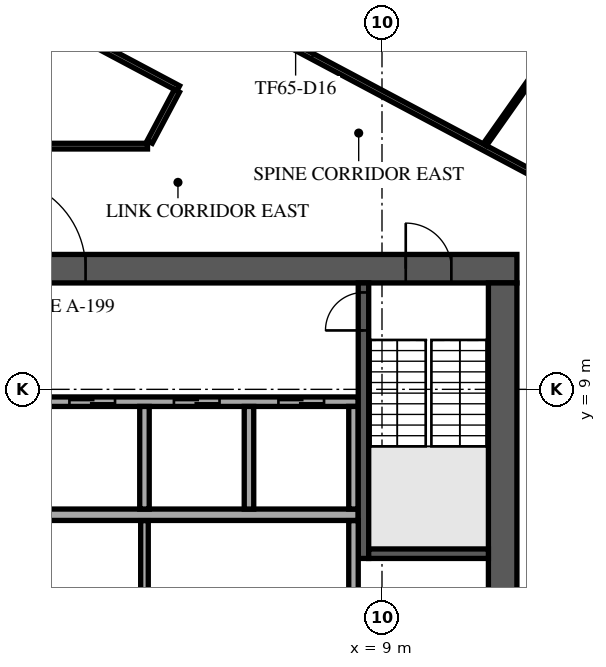
"""IFC4 building model, lengths in metres.
Left out: names, types, materials, properties, quantities, classifications, styles, units other than length and angle.
Written with IfcOpenShell. Run it as: python <this file> out.ifc"""

import sys

from ifc_helpers import new_model, si_unit, direction, frame, frame_2d, origin, place, context, subcontext, project, spatial, rectangle, extrude, element, fill, save


model = new_model("IFC4")
c1 = context("Model", 3, precision=1e-05, world=origin(), true_north=direction((0.0, 1.0)))
c2 = subcontext(c1, "Body", "Model", "MODEL_VIEW")
j1 = project(units=[si_unit("LENGTHUNIT", "METRE"), si_unit("PLANEANGLEUNIT", "RADIAN")], contexts=[c1])
p1 = place(None, origin())
s1 = spatial("IfcSite", under=j1, at=p1, CompositionType="ELEMENT")
p2 = place(p1, origin())
s2 = spatial("IfcBuilding", under=s1, at=p2, CompositionType="ELEMENT")
p3 = place(p2, frame((0.0, 0.0, 274.9)))
s3 = spatial("IfcBuildingStorey", under=s2, at=p3, CompositionType="ELEMENT", Elevation=274.9)
p4 = place(p3, frame((-12.55, 12.175, 0.0), z_axis=(0.0, 0.0, 1.0), x_axis=(1.0, 0.0, 0.0)))
e1 = element("IfcWall", 1, at=p4, inside=s3, PredefinedType="SHEAR", context=c2, shape_type="SweptSolid", body=[
    extrude(rectangle(XDim=25.1, YDim=0.75, at=frame_2d((12.55, 0.0))), origin(), (0.0, 0.0, 1.0), 3.64),
])
p5 = place(p4, frame((11.35, 0.0, 0.0)))
e2 = element("IfcOpeningElement", 2, at=p5, cuts=e1, PredefinedType="OPENING", context=c2, shape_type="SweptSolid", body=[
    extrude(rectangle(XDim=2.4, YDim=2.4, at=frame_2d((1.2, 1.2))), frame((0.0, 0.385, 0.0), z_axis=(0.0, -1.0, 0.0), x_axis=(1.0, 0.0, 0.0)), (0.0, 0.0, 1.0), 0.77),
])
p6 = place(p4, frame((22.175, 0.0, 0.0)))
e3 = element("IfcOpeningElement", 3, at=p6, cuts=e1, PredefinedType="OPENING", context=c2, shape_type="SweptSolid", body=[
    extrude(rectangle(XDim=1.2, YDim=2.1, at=frame_2d((0.6, 1.05))), frame((0.0, 0.385, 0.0), z_axis=(0.0, -1.0, 0.0), x_axis=(1.0, 0.0, 0.0)), (0.0, 0.0, 1.0), 0.77),
])
p7 = place(p4, frame((1.15, 0.0, 0.0)))
e4 = element("IfcOpeningElement", 4, at=p7, cuts=e1, PredefinedType="OPENING", context=c2, shape_type="SweptSolid", body=[
    extrude(rectangle(XDim=1.0, YDim=2.1, at=frame_2d((0.5, 1.05))), frame((0.0, 0.385, 0.0), z_axis=(0.0, -1.0, 0.0), x_axis=(1.0, 0.0, 0.0)), (0.0, 0.0, 1.0), 0.77),
])
p8 = place(p3, frame((12.175, -11.8, 0.0), z_axis=(0.0, 0.0, 1.0), x_axis=(0.0, 1.0, 0.0)))
e5 = element("IfcWall", 5, at=p8, inside=s3, PredefinedType="SHEAR", context=c2, shape_type="SweptSolid", body=[
    extrude(rectangle(XDim=23.6, YDim=0.75, at=frame_2d((11.8, 0.0))), origin(), (0.0, 0.0, 1.0), 3.64),
])
p9 = place(p8, frame((10.6, 0.0, 0.0)))
e6 = element("IfcOpeningElement", 6, at=p9, cuts=e5, PredefinedType="OPENING", context=c2, shape_type="SweptSolid", body=[
    extrude(rectangle(XDim=2.4, YDim=2.4, at=frame_2d((1.2, 1.2))), frame((0.0, 0.385, 0.0), z_axis=(0.0, -1.0, 0.0), x_axis=(1.0, 0.0, 0.0)), (0.0, 0.0, 1.0), 0.77),
])
p10 = place(p3, frame((-8.375, 5.7, 0.0), z_axis=(0.0, 0.0, 1.0), x_axis=(1.0, 0.0, 0.0)))
e7 = element("IfcWall", 7, at=p10, inside=s3, PredefinedType="SOLIDWALL", context=c2, shape_type="SweptSolid", body=[
    extrude(rectangle(XDim=16.75, YDim=0.3, at=frame_2d((8.375, 0.0))), origin(), (0.0, 0.0, 1.0), 3.64),
])
p11 = place(p3, frame((-8.375, 8.675, 0.0), z_axis=(0.0, 0.0, 1.0), x_axis=(1.0, 0.0, 0.0)))
e8 = element("IfcWall", 8, at=p11, inside=s3, PredefinedType="SOLIDWALL", context=c2, shape_type="SweptSolid", body=[
    extrude(rectangle(XDim=16.75, YDim=0.25, at=frame_2d((8.375, 0.0))), origin(), (0.0, 0.0, 1.0), 3.64),
])
p12 = place(p11, frame((0.9, 0.0, 0.0)))
e9 = element("IfcOpeningElement", 9, at=p12, cuts=e8, PredefinedType="OPENING", context=c2, shape_type="SweptSolid", body=[
    extrude(rectangle(XDim=1.2, YDim=2.1, at=frame_2d((0.6, 1.05))), frame((0.0, 0.135, 0.0), z_axis=(0.0, -1.0, 0.0), x_axis=(1.0, 0.0, 0.0)), (0.0, 0.0, 1.0), 0.27),
])
p13 = place(p11, frame((3.65, 0.0, 0.0)))
e10 = element("IfcOpeningElement", 10, at=p13, cuts=e8, PredefinedType="OPENING", context=c2, shape_type="SweptSolid", body=[
    extrude(rectangle(XDim=1.2, YDim=2.1, at=frame_2d((0.6, 1.05))), frame((0.0, 0.135, 0.0), z_axis=(0.0, -1.0, 0.0), x_axis=(1.0, 0.0, 0.0)), (0.0, 0.0, 1.0), 0.27),
])
p14 = place(p11, frame((6.4, 0.0, 0.0)))
e11 = element("IfcOpeningElement", 11, at=p14, cuts=e8, PredefinedType="OPENING", context=c2, shape_type="SweptSolid", body=[
    extrude(rectangle(XDim=1.2, YDim=2.1, at=frame_2d((0.6, 1.05))), frame((0.0, 0.135, 0.0), z_axis=(0.0, -1.0, 0.0), x_axis=(1.0, 0.0, 0.0)), (0.0, 0.0, 1.0), 0.27),
])
p15 = place(p11, frame((9.15, 0.0, 0.0)))
e12 = element("IfcOpeningElement", 12, at=p15, cuts=e8, PredefinedType="OPENING", context=c2, shape_type="SweptSolid", body=[
    extrude(rectangle(XDim=1.2, YDim=2.1, at=frame_2d((0.6, 1.05))), frame((0.0, 0.135, 0.0), z_axis=(0.0, -1.0, 0.0), x_axis=(1.0, 0.0, 0.0)), (0.0, 0.0, 1.0), 0.27),
])
p16 = place(p11, frame((11.9, 0.0, 0.0)))
e13 = element("IfcOpeningElement", 13, at=p16, cuts=e8, PredefinedType="OPENING", context=c2, shape_type="SweptSolid", body=[
    extrude(rectangle(XDim=1.2, YDim=2.1, at=frame_2d((0.6, 1.05))), frame((0.0, 0.135, 0.0), z_axis=(0.0, -1.0, 0.0), x_axis=(1.0, 0.0, 0.0)), (0.0, 0.0, 1.0), 0.27),
])
p17 = place(p11, frame((14.65, 0.0, 0.0)))
e14 = element("IfcOpeningElement", 14, at=p17, cuts=e8, PredefinedType="OPENING", context=c2, shape_type="SweptSolid", body=[
    extrude(rectangle(XDim=1.2, YDim=2.1, at=frame_2d((0.6, 1.05))), frame((0.0, 0.135, 0.0), z_axis=(0.0, -1.0, 0.0), x_axis=(1.0, 0.0, 0.0)), (0.0, 0.0, 1.0), 0.27),
])
for number, where, z_axis, x_axis in (
    (15, (2.75, 5.85, 0.0), (0.0, 0.0, 1.0), (0.0, 1.0, 0.0)),
    (16, (5.5, 5.85, 0.0), (0.0, 0.0, 1.0), (0.0, 1.0, 0.0)),
    (17, (8.25, 5.85, 0.0), (0.0, 0.0, 1.0), (0.0, 1.0, 0.0)),
):
    element("IfcWall", number, at=place(p3, frame(where, z_axis=z_axis, x_axis=x_axis)), inside=s3, PredefinedType="SOLIDWALL", context=c2, shape_type="SweptSolid", body=[
        extrude(rectangle(XDim=2.7, YDim=0.25, at=frame_2d((1.35, 0.0))), origin(), (0.0, 0.0, 1.0), 3.64),
    ])
p18 = place(p3, frame((8.512, 4.55, 0.0), z_axis=(0.0, 0.0, 1.0), x_axis=(0.0, 1.0, 0.0)))
e18 = element("IfcWall", 18, at=p18, inside=s3, PredefinedType="SOLIDWALL", context=c2, shape_type="SweptSolid", body=[
    extrude(rectangle(XDim=7.25, YDim=0.275, at=frame_2d((3.625, 0.0))), origin(), (0.0, 0.0, 1.0), 3.64),
])
p19 = place(p18, frame((6.0, 0.0, 0.0)))
e19 = element("IfcOpeningElement", 19, at=p19, cuts=e18, PredefinedType="OPENING", context=c2, shape_type="SweptSolid", body=[
    extrude(rectangle(XDim=1.0, YDim=2.1, at=frame_2d((0.5, 1.05))), frame((0.0, 0.147, 0.0), z_axis=(0.0, -1.0, 0.0), x_axis=(1.0, 0.0, 0.0)), (0.0, 0.0, 1.0), 0.295),
])
p20 = place(p3, frame((8.65, 4.675, 0.0), z_axis=(0.0, 0.0, 1.0), x_axis=(1.0, 0.0, 0.0)))
e20 = element("IfcWall", 20, at=p20, inside=s3, PredefinedType="SOLIDWALL", context=c2, shape_type="SweptSolid", body=[
    extrude(rectangle(XDim=3.15, YDim=0.25, at=frame_2d((1.575, 0.0))), origin(), (0.0, 0.0, 1.0), 3.64),
])
p21 = place(p3, frame((2.75, 2.855, 0.0), z_axis=(0.0, 0.0, 1.0), x_axis=(0.0, 1.0, 0.0)))
e21 = element("IfcWall", 21, at=p21, inside=s3, PredefinedType="PARTITIONING", context=c2, shape_type="SweptSolid", body=[
    extrude(rectangle(XDim=2.69, YDim=0.2, at=frame_2d((1.345, 0.0))), origin(), (0.0, 0.0, 1.0), 3.64),
])
p22 = place(p3, frame((8.25, 2.855, 0.0), z_axis=(0.0, 0.0, 1.0), x_axis=(0.0, 1.0, 0.0)))
e22 = element("IfcWall", 22, at=p22, inside=s3, PredefinedType="PARTITIONING", context=c2, shape_type="SweptSolid", body=[
    extrude(rectangle(XDim=2.69, YDim=0.25, at=frame_2d((1.345, 0.0))), origin(), (0.0, 0.0, 1.0), 3.64),
])
p23 = place(p3, frame((9.233, -32.479, 0.0), z_axis=(0.0, 0.0, 1.0), x_axis=(0.469468429065, 0.882949259081, 0.0)))
e23 = element("IfcWall", 23, at=p23, inside=s3, PredefinedType="STANDARD", context=c2, shape_type="SweptSolid", body=[
    extrude(rectangle(XDim=48.686, YDim=0.6, at=frame_2d((24.343, 0.0))), origin(), (0.0, 0.0, 1.0), 3.64),
])
p24 = place(p23, frame((1.213, 0.0, 0.9)))
e24 = element("IfcOpeningElement", 24, at=p24, cuts=e23, PredefinedType="OPENING", context=c2, shape_type="SweptSolid", body=[
    extrude(rectangle(XDim=2.0, YDim=2.1, at=frame_2d((1.0, 1.05))), frame((0.0, 0.31, 0.0), z_axis=(0.0, -1.0, 0.0), x_axis=(1.0, 0.0, 0.0)), (0.0, 0.0, 1.0), 0.62),
])
p25 = place(p23, frame((5.639, 0.0, 0.9)))
e25 = element("IfcOpeningElement", 25, at=p25, cuts=e23, PredefinedType="OPENING", context=c2, shape_type="SweptSolid", body=[
    extrude(rectangle(XDim=2.0, YDim=2.1, at=frame_2d((1.0, 1.05))), frame((0.0, 0.31, 0.0), z_axis=(0.0, -1.0, 0.0), x_axis=(1.0, 0.0, 0.0)), (0.0, 0.0, 1.0), 0.62),
])
p26 = place(p23, frame((10.065, 0.0, 0.9)))
e26 = element("IfcOpeningElement", 26, at=p26, cuts=e23, PredefinedType="OPENING", context=c2, shape_type="SweptSolid", body=[
    extrude(rectangle(XDim=2.0, YDim=2.1, at=frame_2d((1.0, 1.05))), frame((0.0, 0.31, 0.0), z_axis=(0.0, -1.0, 0.0), x_axis=(1.0, 0.0, 0.0)), (0.0, 0.0, 1.0), 0.62),
])
p27 = place(p23, frame((14.491, 0.0, 0.9)))
e27 = element("IfcOpeningElement", 27, at=p27, cuts=e23, PredefinedType="OPENING", context=c2, shape_type="SweptSolid", body=[
    extrude(rectangle(XDim=2.0, YDim=2.1, at=frame_2d((1.0, 1.05))), frame((0.0, 0.31, 0.0), z_axis=(0.0, -1.0, 0.0), x_axis=(1.0, 0.0, 0.0)), (0.0, 0.0, 1.0), 0.62),
])
p28 = place(p23, frame((18.917, 0.0, 0.9)))
e28 = element("IfcOpeningElement", 28, at=p28, cuts=e23, PredefinedType="OPENING", context=c2, shape_type="SweptSolid", body=[
    extrude(rectangle(XDim=2.0, YDim=2.1, at=frame_2d((1.0, 1.05))), frame((0.0, 0.31, 0.0), z_axis=(0.0, -1.0, 0.0), x_axis=(1.0, 0.0, 0.0)), (0.0, 0.0, 1.0), 0.62),
])
p29 = place(p23, frame((23.343, 0.0, 0.9)))
e29 = element("IfcOpeningElement", 29, at=p29, cuts=e23, PredefinedType="OPENING", context=c2, shape_type="SweptSolid", body=[
    extrude(rectangle(XDim=2.0, YDim=2.1, at=frame_2d((1.0, 1.05))), frame((0.0, 0.31, 0.0), z_axis=(0.0, -1.0, 0.0), x_axis=(1.0, 0.0, 0.0)), (0.0, 0.0, 1.0), 0.62),
])
p30 = place(p23, frame((27.769, 0.0, 0.9)))
e30 = element("IfcOpeningElement", 30, at=p30, cuts=e23, PredefinedType="OPENING", context=c2, shape_type="SweptSolid", body=[
    extrude(rectangle(XDim=2.0, YDim=2.1, at=frame_2d((1.0, 1.05))), frame((0.0, 0.31, 0.0), z_axis=(0.0, -1.0, 0.0), x_axis=(1.0, 0.0, 0.0)), (0.0, 0.0, 1.0), 0.62),
])
p31 = place(p23, frame((32.195, 0.0, 0.9)))
e31 = element("IfcOpeningElement", 31, at=p31, cuts=e23, PredefinedType="OPENING", context=c2, shape_type="SweptSolid", body=[
    extrude(rectangle(XDim=2.0, YDim=2.1, at=frame_2d((1.0, 1.05))), frame((0.0, 0.31, 0.0), z_axis=(0.0, -1.0, 0.0), x_axis=(1.0, 0.0, 0.0)), (0.0, 0.0, 1.0), 0.62),
])
p32 = place(p23, frame((36.621, 0.0, 0.9)))
e32 = element("IfcOpeningElement", 32, at=p32, cuts=e23, PredefinedType="OPENING", context=c2, shape_type="SweptSolid", body=[
    extrude(rectangle(XDim=2.0, YDim=2.1, at=frame_2d((1.0, 1.05))), frame((0.0, 0.31, 0.0), z_axis=(0.0, -1.0, 0.0), x_axis=(1.0, 0.0, 0.0)), (0.0, 0.0, 1.0), 0.62),
])
p33 = place(p23, frame((41.047, 0.0, 0.9)))
e33 = element("IfcOpeningElement", 33, at=p33, cuts=e23, PredefinedType="OPENING", context=c2, shape_type="SweptSolid", body=[
    extrude(rectangle(XDim=2.0, YDim=2.1, at=frame_2d((1.0, 1.05))), frame((0.0, 0.31, 0.0), z_axis=(0.0, -1.0, 0.0), x_axis=(1.0, 0.0, 0.0)), (0.0, 0.0, 1.0), 0.62),
])
p34 = place(p23, frame((45.473, 0.0, 0.9)))
e34 = element("IfcOpeningElement", 34, at=p34, cuts=e23, PredefinedType="OPENING", context=c2, shape_type="SweptSolid", body=[
    extrude(rectangle(XDim=2.0, YDim=2.1, at=frame_2d((1.0, 1.05))), frame((0.0, 0.31, 0.0), z_axis=(0.0, -1.0, 0.0), x_axis=(1.0, 0.0, 0.0)), (0.0, 0.0, 1.0), 0.62),
])
p35 = place(p3, frame((29.875, 17.753, 0.0), z_axis=(0.0, 0.0, 1.0), x_axis=(-0.88294707281, 0.469472540854, 0.0)))
e35 = element("IfcWall", 35, at=p35, inside=s3, PredefinedType="STANDARD", context=c2, shape_type="SweptSolid", body=[
    extrude(rectangle(XDim=36.243, YDim=0.6, at=frame_2d((18.122, 0.0))), origin(), (0.0, 0.0, 1.0), 3.64),
])
p36 = place(p35, frame((1.215, 0.0, 0.9)))
e36 = element("IfcOpeningElement", 36, at=p36, cuts=e35, PredefinedType="OPENING", context=c2, shape_type="SweptSolid", body=[
    extrude(rectangle(XDim=2.1, YDim=2.1, at=frame_2d((1.05, 1.05))), frame((0.0, 0.31, 0.0), z_axis=(0.0, -1.0, 0.0), x_axis=(1.0, 0.0, 0.0)), (0.0, 0.0, 1.0), 0.62),
])
p37 = place(p35, frame((5.746, 0.0, 0.9)))
e37 = element("IfcOpeningElement", 37, at=p37, cuts=e35, PredefinedType="OPENING", context=c2, shape_type="SweptSolid", body=[
    extrude(rectangle(XDim=2.1, YDim=2.1, at=frame_2d((1.05, 1.05))), frame((0.0, 0.31, 0.0), z_axis=(0.0, -1.0, 0.0), x_axis=(1.0, 0.0, 0.0)), (0.0, 0.0, 1.0), 0.62),
])
p38 = place(p35, frame((10.276, 0.0, 0.9)))
e38 = element("IfcOpeningElement", 38, at=p38, cuts=e35, PredefinedType="OPENING", context=c2, shape_type="SweptSolid", body=[
    extrude(rectangle(XDim=2.1, YDim=2.1, at=frame_2d((1.05, 1.05))), frame((0.0, 0.31, 0.0), z_axis=(0.0, -1.0, 0.0), x_axis=(1.0, 0.0, 0.0)), (0.0, 0.0, 1.0), 0.62),
])
p39 = place(p35, frame((14.806, 0.0, 0.9)))
e39 = element("IfcOpeningElement", 39, at=p39, cuts=e35, PredefinedType="OPENING", context=c2, shape_type="SweptSolid", body=[
    extrude(rectangle(XDim=2.1, YDim=2.1, at=frame_2d((1.05, 1.05))), frame((0.0, 0.31, 0.0), z_axis=(0.0, -1.0, 0.0), x_axis=(1.0, 0.0, 0.0)), (0.0, 0.0, 1.0), 0.62),
])
p40 = place(p35, frame((19.337, 0.0, 0.9)))
e40 = element("IfcOpeningElement", 40, at=p40, cuts=e35, PredefinedType="OPENING", context=c2, shape_type="SweptSolid", body=[
    extrude(rectangle(XDim=2.1, YDim=2.1, at=frame_2d((1.05, 1.05))), frame((0.0, 0.31, 0.0), z_axis=(0.0, -1.0, 0.0), x_axis=(1.0, 0.0, 0.0)), (0.0, 0.0, 1.0), 0.62),
])
p41 = place(p35, frame((23.867, 0.0, 0.9)))
e41 = element("IfcOpeningElement", 41, at=p41, cuts=e35, PredefinedType="OPENING", context=c2, shape_type="SweptSolid", body=[
    extrude(rectangle(XDim=2.1, YDim=2.1, at=frame_2d((1.05, 1.05))), frame((0.0, 0.31, 0.0), z_axis=(0.0, -1.0, 0.0), x_axis=(1.0, 0.0, 0.0)), (0.0, 0.0, 1.0), 0.62),
])
p42 = place(p35, frame((28.398, 0.0, 0.9)))
e42 = element("IfcOpeningElement", 42, at=p42, cuts=e35, PredefinedType="OPENING", context=c2, shape_type="SweptSolid", body=[
    extrude(rectangle(XDim=2.1, YDim=2.1, at=frame_2d((1.05, 1.05))), frame((0.0, 0.31, 0.0), z_axis=(0.0, -1.0, 0.0), x_axis=(1.0, 0.0, 0.0)), (0.0, 0.0, 1.0), 0.62),
])
p43 = place(p35, frame((32.928, 0.0, 0.9)))
e43 = element("IfcOpeningElement", 43, at=p43, cuts=e35, PredefinedType="OPENING", context=c2, shape_type="SweptSolid", body=[
    extrude(rectangle(XDim=2.1, YDim=2.1, at=frame_2d((1.05, 1.05))), frame((0.0, 0.31, 0.0), z_axis=(0.0, -1.0, 0.0), x_axis=(1.0, 0.0, 0.0)), (0.0, 0.0, 1.0), 0.62),
])
p44 = place(p3, frame((-15.325, 15.4, 0.0), z_axis=(0.0, 0.0, 1.0), x_axis=(1.0, 0.0, 0.0)))
e44 = element("IfcWall", 44, at=p44, inside=s3, PredefinedType="PARTITIONING", context=c2, shape_type="SweptSolid", body=[
    extrude(rectangle(XDim=18.155, YDim=0.15, at=frame_2d((9.078, 0.0))), origin(), (0.0, 0.0, 1.0), 3.24),
])
p45 = place(p44, frame((2.8, 0.0, 0.0)))
e45 = element("IfcOpeningElement", 45, at=p45, cuts=e44, PredefinedType="OPENING", context=c2, shape_type="SweptSolid", body=[
    extrude(rectangle(XDim=1.8, YDim=2.1, at=frame_2d((0.9, 1.05))), frame((0.0, 0.085, 0.0), z_axis=(0.0, -1.0, 0.0), x_axis=(1.0, 0.0, 0.0)), (0.0, 0.0, 1.0), 0.17),
])
p46 = place(p3, frame((-9.512, 23.914, 0.0), z_axis=(0.0, 0.0, 1.0), x_axis=(0.882964773335, -0.469439249583, 0.0)))
e46 = element("IfcWall", 46, at=p46, inside=s3, PredefinedType="PARTITIONING", context=c2, shape_type="SweptSolid", body=[
    extrude(rectangle(XDim=14.894, YDim=0.15, at=frame_2d((7.447, 0.0))), origin(), (0.0, 0.0, 1.0), 3.04),
])
p47 = place(p46, frame((2.296, 0.0, 0.0)))
e47 = element("IfcOpeningElement", 47, at=p47, cuts=e46, PredefinedType="OPENING", context=c2, shape_type="SweptSolid", body=[
    extrude(rectangle(XDim=1.0, YDim=2.1, at=frame_2d((0.5, 1.05))), frame((0.0, 0.085, 0.0), z_axis=(0.0, -1.0, 0.0), x_axis=(1.0, 0.0, 0.0)), (0.0, 0.0, 1.0), 0.17),
])
p48 = place(p46, frame((6.307, 0.0, 0.0)))
e48 = element("IfcOpeningElement", 48, at=p48, cuts=e46, PredefinedType="OPENING", context=c2, shape_type="SweptSolid", body=[
    extrude(rectangle(XDim=1.0, YDim=2.1, at=frame_2d((0.5, 1.05))), frame((0.0, 0.085, 0.0), z_axis=(0.0, -1.0, 0.0), x_axis=(1.0, 0.0, 0.0)), (0.0, 0.0, 1.0), 0.17),
])
p49 = place(p3, frame((-8.385, 26.033, 0.0), z_axis=(0.0, 0.0, 1.0), x_axis=(0.882949433839, -0.46946810039, 0.0)))
e49 = element("IfcWall", 49, at=p49, inside=s3, PredefinedType="PARTITIONING", context=c2, shape_type="SweptSolid", body=[
    extrude(rectangle(XDim=39.325, YDim=0.15, at=frame_2d((19.662, 0.0))), origin(), (0.0, 0.0, 1.0), 3.04),
])
p50 = place(p49, frame((10.622, 0.0, 0.0)))
e50 = element("IfcOpeningElement", 50, at=p50, cuts=e49, PredefinedType="OPENING", context=c2, shape_type="SweptSolid", body=[
    extrude(rectangle(XDim=1.0, YDim=2.1, at=frame_2d((0.5, 1.05))), frame((0.0, 0.085, 0.0), z_axis=(0.0, -1.0, 0.0), x_axis=(1.0, 0.0, 0.0)), (0.0, 0.0, 1.0), 0.17),
])
p51 = place(p49, frame((16.615, 0.0, 0.0)))
e51 = element("IfcOpeningElement", 51, at=p51, cuts=e49, PredefinedType="OPENING", context=c2, shape_type="SweptSolid", body=[
    extrude(rectangle(XDim=1.0, YDim=2.1, at=frame_2d((0.5, 1.05))), frame((0.0, 0.085, 0.0), z_axis=(0.0, -1.0, 0.0), x_axis=(1.0, 0.0, 0.0)), (0.0, 0.0, 1.0), 0.17),
])
p52 = place(p49, frame((28.254, 0.0, 0.0)))
e52 = element("IfcOpeningElement", 52, at=p52, cuts=e49, PredefinedType="OPENING", context=c2, shape_type="SweptSolid", body=[
    extrude(rectangle(XDim=1.0, YDim=2.1, at=frame_2d((0.5, 1.05))), frame((0.0, 0.085, 0.0), z_axis=(0.0, -1.0, 0.0), x_axis=(1.0, 0.0, 0.0)), (0.0, 0.0, 1.0), 0.17),
])
p53 = place(p3, frame((2.889, 15.51, 0.0), z_axis=(0.0, 0.0, 1.0), x_axis=(0.469315326783, 0.883030647286, 0.0)))
e53 = element("IfcWall", 53, at=p53, inside=s3, PredefinedType="PARTITIONING", context=c2, shape_type="SweptSolid", body=[
    extrude(rectangle(XDim=1.524, YDim=0.15, at=frame_2d((0.762, 0.0))), origin(), (0.0, 0.0, 1.0), 3.24),
])
p54 = place(p3, frame((11.709, 15.441, 0.0), z_axis=(0.0, 0.0, 1.0), x_axis=(0.575721307139, 0.817645997058, 0.0)))
e54 = element("IfcWall", 54, at=p54, inside=s3, PredefinedType="PARTITIONING", context=c2, shape_type="SweptSolid", body=[
    extrude(rectangle(XDim=10.348, YDim=0.1, at=frame_2d((5.174, 0.0))), origin(), (0.0, 0.0, 1.0), 3.04),
])
p55 = place(p5, origin())
e55 = element("IfcDoor", 55, at=p55, inside=s3, OperationType="SINGLE_SWING_LEFT", PredefinedType="DOOR", context=c2, shape_type="SweptSolid", body=[
    extrude(rectangle(XDim=2.4, YDim=2.4, at=frame_2d((1.2, 1.2))), frame((0.0, 0.025, 0.0), z_axis=(0.0, -1.0, 0.0), x_axis=(1.0, 0.0, 0.0)), (0.0, 0.0, 1.0), 0.05),
])
fill(e2, e55)
p56 = place(p6, origin())
e56 = element("IfcDoor", 56, at=p56, inside=s3, OperationType="SINGLE_SWING_LEFT", PredefinedType="DOOR", context=c2, shape_type="SweptSolid", body=[
    extrude(rectangle(XDim=1.2, YDim=2.1, at=frame_2d((0.6, 1.05))), frame((0.0, 0.025, 0.0), z_axis=(0.0, -1.0, 0.0), x_axis=(1.0, 0.0, 0.0)), (0.0, 0.0, 1.0), 0.05),
])
fill(e3, e56)
p57 = place(p15, origin())
e57 = element("IfcDoor", 57, at=p57, inside=s3, OperationType="DOUBLE_DOOR_SLIDING", PredefinedType="DOOR", context=c2, shape_type="SweptSolid", body=[
    extrude(rectangle(XDim=1.2, YDim=2.1, at=frame_2d((0.6, 1.05))), frame((0.0, 0.025, 0.0), z_axis=(0.0, -1.0, 0.0), x_axis=(1.0, 0.0, 0.0)), (0.0, 0.0, 1.0), 0.05),
])
fill(e12, e57)
p58 = place(p16, origin())
e58 = element("IfcDoor", 58, at=p58, inside=s3, OperationType="DOUBLE_DOOR_SLIDING", PredefinedType="DOOR", context=c2, shape_type="SweptSolid", body=[
    extrude(rectangle(XDim=1.2, YDim=2.1, at=frame_2d((0.6, 1.05))), frame((0.0, 0.025, 0.0), z_axis=(0.0, -1.0, 0.0), x_axis=(1.0, 0.0, 0.0)), (0.0, 0.0, 1.0), 0.05),
])
fill(e13, e58)
p59 = place(p17, origin())
e59 = element("IfcDoor", 59, at=p59, inside=s3, OperationType="DOUBLE_DOOR_SLIDING", PredefinedType="DOOR", context=c2, shape_type="SweptSolid", body=[
    extrude(rectangle(XDim=1.2, YDim=2.1, at=frame_2d((0.6, 1.05))), frame((0.0, 0.025, 0.0), z_axis=(0.0, -1.0, 0.0), x_axis=(1.0, 0.0, 0.0)), (0.0, 0.0, 1.0), 0.05),
])
fill(e14, e59)
p60 = place(p19, origin())
e60 = element("IfcDoor", 60, at=p60, inside=s3, OperationType="SINGLE_SWING_LEFT", PredefinedType="DOOR", context=c2, shape_type="SweptSolid", body=[
    extrude(rectangle(XDim=1.0, YDim=2.1, at=frame_2d((0.5, 1.05))), frame((0.0, 0.025, 0.0), z_axis=(0.0, -1.0, 0.0), x_axis=(1.0, 0.0, 0.0)), (0.0, 0.0, 1.0), 0.05),
])
fill(e19, e60)
p61 = place(p51, origin())
e61 = element("IfcDoor", 61, at=p61, inside=s3, OperationType="SINGLE_SWING_LEFT", PredefinedType="DOOR", context=c2, shape_type="SweptSolid", body=[
    extrude(rectangle(XDim=1.0, YDim=2.1, at=frame_2d((0.5, 1.05))), frame((0.0, 0.025, 0.0), z_axis=(0.0, -1.0, 0.0), x_axis=(1.0, 0.0, 0.0)), (0.0, 0.0, 1.0), 0.05),
])
fill(e51, e61)
save(model, sys.argv[1])
